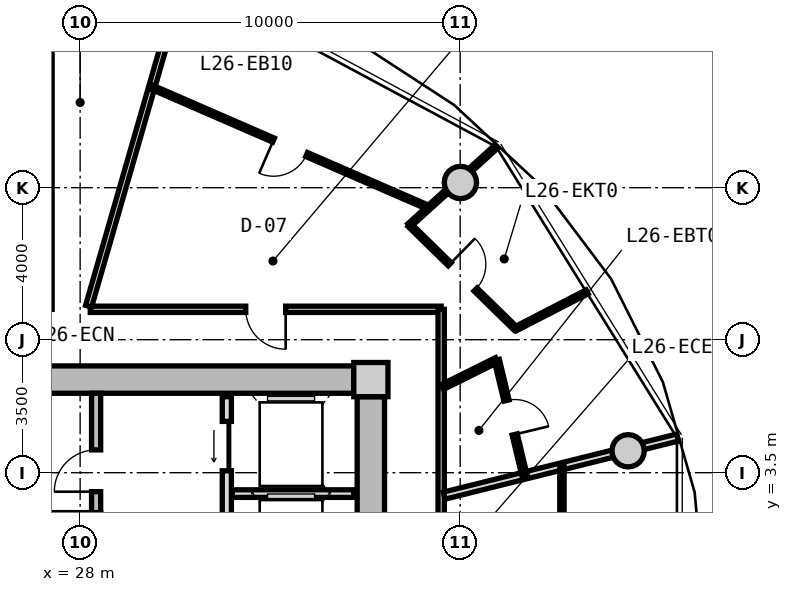
"""IFC4 building model, lengths in metres.
Left out: names, types, materials, properties, quantities, classifications, styles, units other than length and angle.
Written with IfcOpenShell. Run it as: python <this file> out.ifc"""

import sys

from ifc_helpers import new_model, si_unit, direction, frame, frame_2d, origin, origin_2d, place, context, subcontext, project, spatial, rectangle, circle, extrude, source, transform, mapped, element, fill, save


model = new_model("IFC4")
c1 = context("Model", 3, precision=1e-05, world=origin(), true_north=direction((0.0, 1.0)))
c2 = subcontext(c1, "Body", "Model", "MODEL_VIEW")
j1 = project(units=[si_unit("LENGTHUNIT", "METRE"), si_unit("PLANEANGLEUNIT", "RADIAN")], contexts=[c1])
p1 = place(None, origin())
s1 = spatial("IfcSite", under=j1, at=p1, CompositionType="ELEMENT")
p2 = place(p1, origin())
s2 = spatial("IfcBuilding", under=s1, at=p2, CompositionType="ELEMENT")
p3 = place(p2, frame((0.0, 0.0, 87.1)))
s3 = spatial("IfcBuildingStorey", under=s2, at=p3, CompositionType="ELEMENT", Elevation=87.1)
m1 = source(origin(), c2, "Body", "SweptSolid", [
    extrude(rectangle(XDim=0.9, YDim=0.9, at=origin_2d()), origin(), (0.0, 0.0, 1.0), 3.05),
])
p4 = place(p3, frame((35.65, 5.95, 0.0), z_axis=(0.0, 0.0, 1.0), x_axis=(1.0, 0.0, 0.0)))
e1 = element("IfcColumn", 1, at=p4, inside=s3, PredefinedType="COLUMN", context=c2, shape_type="MappedRepresentation", body=[
    mapped(m1, transform((0.0, 0.0, 0.0), x_axis=(1.0, 0.0, 0.0), y_axis=(0.0, 1.0, 0.0), z_axis=(0.0, 0.0, 1.0), scale=1.0)),
])
m2 = source(origin(), c2, "Body", "SweptSolid", [
    extrude(rectangle(XDim=14.4, YDim=0.72, at=frame_2d((7.2, 0.0))), origin(), (0.0, 0.0, 1.0), 2.79),
])
p5 = place(p3, frame((20.8, 5.95, 0.0), z_axis=(0.0, 0.0, 1.0), x_axis=(1.0, 0.0, 0.0)))
e2 = element("IfcWall", 2, at=p5, inside=s3, PredefinedType="SHEAR", context=c2, shape_type="MappedRepresentation", body=[
    mapped(m2, transform((0.0, 0.0, 0.0), x_axis=(1.0, 0.0, 0.0), y_axis=(0.0, 1.0, 0.0), z_axis=(0.0, 0.0, 1.0), scale=1.0)),
])
m3 = source(origin(), c2, "Body", "SweptSolid", [
    extrude(rectangle(XDim=11.0, YDim=0.72, at=frame_2d((5.5, 0.0))), origin(), (0.0, 0.0, 1.0), 2.79),
])
p6 = place(p3, frame((35.65, 5.5, 0.0), z_axis=(0.0, 0.0, 1.0), x_axis=(0.0, -1.0, 0.0)))
e3 = element("IfcWall", 3, at=p6, inside=s3, PredefinedType="SHEAR", context=c2, shape_type="MappedRepresentation", body=[
    mapped(m3, transform((0.0, 0.0, 0.0), x_axis=(1.0, 0.0, 0.0), y_axis=(0.0, 1.0, 0.0), z_axis=(0.0, 0.0, 1.0), scale=1.0)),
])
p7 = place(p6, frame((5.65, 0.0, 0.0)))
e4 = element("IfcOpeningElement", 4, at=p7, cuts=e3, PredefinedType="OPENING", context=c2, shape_type="SweptSolid", body=[
    extrude(rectangle(XDim=1.2, YDim=2.15, at=frame_2d((0.6, 1.075))), frame((0.0, 0.37, 0.0), z_axis=(0.0, -1.0, 0.0), x_axis=(1.0, 0.0, 0.0)), (0.0, 0.0, 1.0), 0.74),
])
m4 = source(origin(), c2, "Body", "SweptSolid", [
    extrude(circle(Radius=0.425, at=origin_2d()), origin(), (0.0, 0.0, 1.0), 3.05),
])
for number, where, z_axis, x_axis in (
    (5, (42.419, 4.076, 0.0), (0.0, 0.0, 1.0), (1.0, 0.0, 0.0)),
    (6, (38.006, 11.137, 0.0), (0.0, 0.0, 1.0), (1.0, 0.0, 0.0)),
):
    element("IfcColumn", number, at=place(p3, frame(where, z_axis=z_axis, x_axis=x_axis)), inside=s3, PredefinedType="COLUMN", context=c2, shape_type="MappedRepresentation", body=[
        mapped(m4, transform((0.0, 0.0, 0.0), x_axis=(1.0, 0.0, 0.0), y_axis=(0.0, 1.0, 0.0), z_axis=(0.0, 0.0, 1.0), scale=1.0)),
    ])
m5 = source(origin(), c2, "Body", "SweptSolid", [
    extrude(rectangle(XDim=3.14, YDim=0.24, at=frame_2d((1.57, 0.0))), origin(), (0.0, 0.0, 1.0), 2.79),
])
p8 = place(p3, frame((28.42, 2.45, 0.0), z_axis=(0.0, 0.0, 1.0), x_axis=(0.0, 1.0, 0.0)))
e7 = element("IfcWall", 7, at=p8, inside=s3, PredefinedType="PARTITIONING", context=c2, shape_type="MappedRepresentation", body=[
    mapped(m5, transform((0.0, 0.0, 0.0), x_axis=(1.0, 0.0, 0.0), y_axis=(0.0, 1.0, 0.0), z_axis=(0.0, 0.0, 1.0), scale=1.0)),
])
p9 = place(p8, frame((0.55, 0.0, 0.0)))
e8 = element("IfcOpeningElement", 8, at=p9, cuts=e7, PredefinedType="OPENING", context=c2, shape_type="SweptSolid", body=[
    extrude(rectangle(XDim=1.1, YDim=2.15, at=frame_2d((0.55, 1.075))), frame((0.0, 0.13, 0.0), z_axis=(0.0, -1.0, 0.0), x_axis=(1.0, 0.0, 0.0)), (0.0, 0.0, 1.0), 0.26),
])
m6 = source(origin(), c2, "Body", "SweptSolid", [
    extrude(rectangle(XDim=5.0, YDim=0.24, at=frame_2d((2.5, 0.0))), origin(), (0.0, 0.0, 1.0), 2.775),
])
p10 = place(p3, frame((31.86, 0.5, 0.0), z_axis=(0.0, 0.0, 1.0), x_axis=(0.0, 1.0, 0.0)))
e9 = element("IfcWall", 9, at=p10, inside=s3, PredefinedType="PARTITIONING", context=c2, shape_type="MappedRepresentation", body=[
    mapped(m6, transform((0.0, 0.0, 0.0), x_axis=(1.0, 0.0, 0.0), y_axis=(0.0, 1.0, 0.0), z_axis=(0.0, 0.0, 1.0), scale=1.0)),
])
p11 = place(p10, frame((3.05, 0.0, 0.0)))
e10 = element("IfcOpeningElement", 10, at=p11, cuts=e9, PredefinedType="OPENING", context=c2, shape_type="SweptSolid", body=[
    extrude(rectangle(XDim=1.3, YDim=2.2, at=frame_2d((0.65, 1.1))), frame((0.0, 0.13, 0.0), z_axis=(0.0, -1.0, 0.0), x_axis=(1.0, 0.0, 0.0)), (0.0, 0.0, 1.0), 0.26),
])
p12 = place(p10, frame((0.55, 0.0, 0.0)))
e11 = element("IfcOpeningElement", 11, at=p12, cuts=e9, PredefinedType="OPENING", context=c2, shape_type="SweptSolid", body=[
    extrude(rectangle(XDim=1.3, YDim=2.2, at=frame_2d((0.65, 1.1))), frame((0.0, 0.13, 0.0), z_axis=(0.0, -1.0, 0.0), x_axis=(1.0, 0.0, 0.0)), (0.0, 0.0, 1.0), 0.26),
])
m7 = source(origin(), c2, "Body", "SweptSolid", [
    extrude(rectangle(XDim=3.2, YDim=0.2, at=frame_2d((1.6, 0.0))), origin(), (0.0, 0.0, 1.0), 2.775),
])
p13 = place(p3, frame((32.0, 2.95, 0.0), z_axis=(0.0, 0.0, 1.0), x_axis=(1.0, 0.0, 0.0)))
e12 = element("IfcWall", 12, at=p13, inside=s3, PredefinedType="PARTITIONING", context=c2, shape_type="MappedRepresentation", body=[
    mapped(m7, transform((0.0, 0.0, 0.0), x_axis=(1.0, 0.0, 0.0), y_axis=(0.0, 1.0, 0.0), z_axis=(0.0, 0.0, 1.0), scale=1.0)),
])
m8 = source(origin(), c2, "Body", "SweptSolid", [
    extrude(rectangle(XDim=9.234, YDim=0.165, at=frame_2d((4.617, 0.0))), origin(), (0.0, 0.0, 1.0), 2.775),
])
p14 = place(p3, frame((28.266, 7.8, 0.0), z_axis=(0.0, 0.0, 1.0), x_axis=(1.0, 0.0, 0.0)))
e13 = element("IfcWall", 13, at=p14, inside=s3, PredefinedType="PARTITIONING", context=c2, shape_type="MappedRepresentation", body=[
    mapped(m8, transform((0.0, 0.0, 0.0), x_axis=(1.0, 0.0, 0.0), y_axis=(0.0, 1.0, 0.0), z_axis=(0.0, 0.0, 1.0), scale=1.0)),
])
p15 = place(p14, frame((4.092, 0.0, 0.0)))
e14 = element("IfcOpeningElement", 14, at=p15, cuts=e13, PredefinedType="OPENING", context=c2, shape_type="SweptSolid", body=[
    extrude(rectangle(XDim=1.05, YDim=2.15, at=frame_2d((0.525, 1.075))), frame((0.0, 0.093, 0.0), z_axis=(0.0, -1.0, 0.0), x_axis=(1.0, 0.0, 0.0)), (0.0, 0.0, 1.0), 0.185),
])
m9 = source(origin(), c2, "Body", "SweptSolid", [
    extrude(rectangle(XDim=15.6, YDim=0.165, at=frame_2d((7.8, 0.0))), origin(), (0.0, 0.0, 1.0), 2.775),
])
p16 = place(p3, frame((37.5, 7.8, 0.0), z_axis=(0.0, 0.0, 1.0), x_axis=(0.0, -1.0, 0.0)))
e15 = element("IfcWall", 15, at=p16, inside=s3, PredefinedType="PARTITIONING", context=c2, shape_type="MappedRepresentation", body=[
    mapped(m9, transform((0.0, 0.0, 0.0), x_axis=(1.0, 0.0, 0.0), y_axis=(0.0, 1.0, 0.0), z_axis=(0.0, 0.0, 1.0), scale=1.0)),
])
p17 = place(p16, frame((9.177, 0.0, 0.0)))
e16 = element("IfcOpeningElement", 16, at=p17, cuts=e15, PredefinedType="OPENING", context=c2, shape_type="SweptSolid", body=[
    extrude(rectangle(XDim=1.05, YDim=2.15, at=frame_2d((0.525, 1.075))), frame((0.0, 0.093, 0.0), z_axis=(0.0, -1.0, 0.0), x_axis=(1.0, 0.0, 0.0)), (0.0, 0.0, 1.0), 0.185),
])
m10 = source(origin(), c2, "Body", "SweptSolid", [
    extrude(rectangle(XDim=8.989, YDim=0.165, at=frame_2d((4.495, 0.0))), origin(), (0.0, 0.0, 1.0), 2.275),
])
p18 = place(p3, frame((28.222, 7.88, 0.0), z_axis=(0.0, 0.0, 1.0), x_axis=(0.27702323008, 0.960863221274, 0.0)))
e17 = element("IfcWall", 17, at=p18, inside=s3, PredefinedType="PARTITIONING", context=c2, shape_type="MappedRepresentation", body=[
    mapped(m10, transform((0.0, 0.0, 0.0), x_axis=(1.0, 0.0, 0.0), y_axis=(0.0, 1.0, 0.0), z_axis=(0.0, 0.0, 1.0), scale=1.0)),
])
m11 = source(origin(), c2, "Body", "SweptSolid", [
    extrude(rectangle(XDim=6.331, YDim=0.19, at=frame_2d((3.165, 0.0))), origin(), (0.0, 0.0, 1.0), 2.275),
])
p19 = place(p3, frame((37.58, 2.896, 0.0), z_axis=(0.0, 0.0, 1.0), x_axis=(0.97036440661, 0.241646267062, 0.0)))
e18 = element("IfcWall", 18, at=p19, inside=s3, PredefinedType="PARTITIONING", context=c2, shape_type="MappedRepresentation", body=[
    mapped(m11, transform((0.0, 0.0, 0.0), x_axis=(1.0, 0.0, 0.0), y_axis=(0.0, 1.0, 0.0), z_axis=(0.0, 0.0, 1.0), scale=1.0)),
])
m12 = source(origin(), c2, "Body", "SweptSolid", [
    extrude(rectangle(XDim=7.375, YDim=0.115, at=frame_2d((3.688, 0.0))), origin(), (0.0, 0.0, 1.0), 2.775),
])
p20 = place(p3, frame((40.678, -3.688, 0.0), z_axis=(0.0, 0.0, 1.0), x_axis=(0.0, 1.0, 0.0)))
e19 = element("IfcWall", 19, at=p20, inside=s3, PredefinedType="PARTITIONING", context=c2, shape_type="MappedRepresentation", body=[
    mapped(m12, transform((0.0, 0.0, 0.0), x_axis=(1.0, 0.0, 0.0), y_axis=(0.0, 1.0, 0.0), z_axis=(0.0, 0.0, 1.0), scale=1.0)),
])
p21 = place(p20, frame((3.213, 0.0, 0.0)))
e20 = element("IfcOpeningElement", 20, at=p21, cuts=e19, PredefinedType="OPENING", context=c2, shape_type="SweptSolid", body=[
    extrude(rectangle(XDim=0.95, YDim=2.1, at=frame_2d((0.475, 1.05))), frame((0.0, 0.067, 0.0), z_axis=(0.0, -1.0, 0.0), x_axis=(1.0, 0.0, 0.0)), (0.0, 0.0, 1.0), 0.135),
])
m13 = source(origin(), c2, "Body", "SweptSolid", [
    extrude(rectangle(XDim=7.938, YDim=0.115, at=frame_2d((3.969, 0.0))), origin(), (0.0, 0.0, 1.0), 2.775),
])
p22 = place(p3, frame((37.164, 10.479, 0.0), z_axis=(0.0, 0.0, 1.0), x_axis=(-0.917052940979, 0.398765474235, 0.0)))
e21 = element("IfcWall", 21, at=p22, inside=s3, PredefinedType="PARTITIONING", context=c2, shape_type="MappedRepresentation", body=[
    mapped(m13, transform((0.0, 0.0, 0.0), x_axis=(1.0, 0.0, 0.0), y_axis=(0.0, 1.0, 0.0), z_axis=(0.0, 0.0, 1.0), scale=1.0)),
])
p23 = place(p22, frame((3.494, 0.0, 0.0)))
e22 = element("IfcOpeningElement", 22, at=p23, cuts=e21, PredefinedType="OPENING", context=c2, shape_type="SweptSolid", body=[
    extrude(rectangle(XDim=0.95, YDim=2.1, at=frame_2d((0.475, 1.05))), frame((0.0, 0.067, 0.0), z_axis=(0.0, -1.0, 0.0), x_axis=(1.0, 0.0, 0.0)), (0.0, 0.0, 1.0), 0.135),
])
m14 = source(origin(), c2, "Body", "SweptSolid", [
    extrude(rectangle(XDim=3.102, YDim=0.115, at=frame_2d((1.551, 0.0))), origin(), (0.0, 0.0, 1.0), 2.275),
])
p24 = place(p3, frame((36.661, 10.01, 0.0), z_axis=(0.0, 0.0, 1.0), x_axis=(0.741263481794, 0.671214161471, 0.0)))
e23 = element("IfcWall", 23, at=p24, inside=s3, PredefinedType="PARTITIONING", context=c2, shape_type="MappedRepresentation", body=[
    mapped(m14, transform((0.0, 0.0, 0.0), x_axis=(1.0, 0.0, 0.0), y_axis=(0.0, 1.0, 0.0), z_axis=(0.0, 0.0, 1.0), scale=1.0)),
])
m15 = source(origin(), c2, "Body", "SweptSolid", [
    extrude(rectangle(XDim=1.6, YDim=0.14, at=frame_2d((0.8, 0.0))), origin(), (0.0, 0.0, 1.0), 2.775),
])
p25 = place(p3, frame((37.53, 5.754, 0.0), z_axis=(0.0, 0.0, 1.0), x_axis=(0.895522919837, 0.445015393044, 0.0)))
e24 = element("IfcWall", 24, at=p25, inside=s3, PredefinedType="PARTITIONING", context=c2, shape_type="MappedRepresentation", body=[
    mapped(m15, transform((0.0, 0.0, 0.0), x_axis=(1.0, 0.0, 0.0), y_axis=(0.0, 1.0, 0.0), z_axis=(0.0, 0.0, 1.0), scale=1.0)),
])
m16 = source(origin(), c2, "Body", "SweptSolid", [
    extrude(rectangle(XDim=3.112, YDim=0.14, at=frame_2d((1.556, 0.0))), origin(), (0.0, 0.0, 1.0), 2.415),
])
p26 = place(p3, frame((38.963, 6.466, 0.0), z_axis=(0.0, 0.0, 1.0), x_axis=(0.233737944029, -0.972299631555, 0.0)))
e25 = element("IfcWall", 25, at=p26, inside=s3, PredefinedType="PARTITIONING", context=c2, shape_type="MappedRepresentation", body=[
    mapped(m16, transform((0.0, 0.0, 0.0), x_axis=(1.0, 0.0, 0.0), y_axis=(0.0, 1.0, 0.0), z_axis=(0.0, 0.0, 1.0), scale=1.0)),
])
p27 = place(p26, frame((1.096, 0.0, 0.0)))
e26 = element("IfcOpeningElement", 26, at=p27, cuts=e25, PredefinedType="OPENING", context=c2, shape_type="SweptSolid", body=[
    extrude(rectangle(XDim=0.92, YDim=2.1, at=frame_2d((0.46, 1.05))), frame((0.0, 0.08, 0.0), z_axis=(0.0, -1.0, 0.0), x_axis=(1.0, 0.0, 0.0)), (0.0, 0.0, 1.0), 0.16),
])
m17 = source(origin(), c2, "Body", "SweptSolid", [
    extrude(rectangle(XDim=2.117, YDim=0.115, at=frame_2d((1.059, 0.0))), origin(), (0.0, 0.0, 1.0), 2.775),
])
p28 = place(p3, frame((39.46, 7.289, 0.0), z_axis=(0.0, 0.0, 1.0), x_axis=(0.888941834945, 0.45802010227, 0.0)))
e27 = element("IfcWall", 27, at=p28, inside=s3, PredefinedType="PARTITIONING", context=c2, shape_type="MappedRepresentation", body=[
    mapped(m17, transform((0.0, 0.0, 0.0), x_axis=(1.0, 0.0, 0.0), y_axis=(0.0, 1.0, 0.0), z_axis=(0.0, 0.0, 1.0), scale=1.0)),
])
m18 = source(origin(), c2, "Body", "SweptSolid", [
    extrude(rectangle(XDim=3.902, YDim=0.115, at=frame_2d((1.951, 0.0))), origin(), (0.0, 0.0, 1.0), 2.775),
])
p29 = place(p3, frame((39.46, 7.289, 0.0), z_axis=(0.0, 0.0, 1.0), x_axis=(-0.714853061854, 0.699274695637, 0.0)))
e28 = element("IfcWall", 28, at=p29, inside=s3, PredefinedType="PARTITIONING", context=c2, shape_type="MappedRepresentation", body=[
    mapped(m18, transform((0.0, 0.0, 0.0), x_axis=(1.0, 0.0, 0.0), y_axis=(0.0, 1.0, 0.0), z_axis=(0.0, 0.0, 1.0), scale=1.0)),
])
p30 = place(p29, frame((1.476, 0.0, 0.0)))
e29 = element("IfcOpeningElement", 29, at=p30, cuts=e28, PredefinedType="OPENING", context=c2, shape_type="SweptSolid", body=[
    extrude(rectangle(XDim=0.95, YDim=2.1, at=frame_2d((0.475, 1.05))), frame((0.0, 0.067, 0.0), z_axis=(0.0, -1.0, 0.0), x_axis=(1.0, 0.0, 0.0)), (0.0, 0.0, 1.0), 0.135),
])
m19 = source(origin(), c2, "Body", "SweptSolid", [
    extrude(rectangle(XDim=1.1, YDim=2.15, at=frame_2d((0.55, 1.075))), frame((0.0, 0.025, 0.0), z_axis=(0.0, -1.0, 0.0), x_axis=(1.0, 0.0, 0.0)), (0.0, 0.0, 1.0), 0.05),
])
p31 = place(p9, origin())
e30 = element("IfcDoor", 30, at=p31, inside=s3, OperationType="SINGLE_SWING_LEFT", PredefinedType="DOOR", context=c2, shape_type="MappedRepresentation", body=[
    mapped(m19, transform((0.0, 0.0, 0.0), x_axis=(1.0, 0.0, 0.0), y_axis=(0.0, 1.0, 0.0), z_axis=(0.0, 0.0, 1.0), scale=1.0)),
])
fill(e8, e30)
m20 = source(origin(), c2, "Body", "SweptSolid", [
    extrude(rectangle(XDim=1.3, YDim=2.2, at=frame_2d((0.65, 1.1))), frame((0.0, 0.025, 0.0), z_axis=(0.0, -1.0, 0.0), x_axis=(1.0, 0.0, 0.0)), (0.0, 0.0, 1.0), 0.05),
])
p32 = place(p11, origin())
e31 = element("IfcDoor", 31, at=p32, inside=s3, OperationType="SLIDING_TO_LEFT", PredefinedType="DOOR", context=c2, shape_type="MappedRepresentation", body=[
    mapped(m20, transform((0.0, 0.0, 0.0), x_axis=(1.0, 0.0, 0.0), y_axis=(0.0, 1.0, 0.0), z_axis=(0.0, 0.0, 1.0), scale=1.0)),
])
fill(e10, e31)
m21 = source(origin(), c2, "Body", "SweptSolid", [
    extrude(rectangle(XDim=1.05, YDim=2.15, at=frame_2d((0.525, 1.075))), frame((0.0, 0.025, 0.0), z_axis=(0.0, -1.0, 0.0), x_axis=(1.0, 0.0, 0.0)), (0.0, 0.0, 1.0), 0.05),
])
p33 = place(p15, frame((1.05, 0.0, 0.0), z_axis=(0.0, 0.0, 1.0), x_axis=(-1.0, 0.0, 0.0)))
e32 = element("IfcDoor", 32, at=p33, inside=s3, OperationType="SINGLE_SWING_LEFT", PredefinedType="DOOR", context=c2, shape_type="MappedRepresentation", body=[
    mapped(m21, transform((0.0, 0.0, 0.0), x_axis=(1.0, 0.0, 0.0), y_axis=(0.0, 1.0, 0.0), z_axis=(0.0, 0.0, 1.0), scale=1.0)),
])
fill(e14, e32)
m22 = source(origin(), c2, "Body", "SweptSolid", [
    extrude(rectangle(XDim=0.92, YDim=2.1, at=frame_2d((0.46, 1.05))), frame((0.0, 0.025, 0.0), z_axis=(0.0, -1.0, 0.0), x_axis=(1.0, 0.0, 0.0)), (0.0, 0.0, 1.0), 0.05),
])
p34 = place(p27, origin())
e33 = element("IfcDoor", 33, at=p34, inside=s3, OperationType="SINGLE_SWING_RIGHT", PredefinedType="DOOR", context=c2, shape_type="MappedRepresentation", body=[
    mapped(m22, transform((0.0, 0.0, 0.0), x_axis=(1.0, 0.0, 0.0), y_axis=(0.0, 1.0, 0.0), z_axis=(0.0, 0.0, 1.0), scale=1.0)),
])
fill(e26, e33)
m23 = source(origin(), c2, "Body", "SweptSolid", [
    extrude(rectangle(XDim=0.95, YDim=2.1, at=frame_2d((0.475, 1.05))), frame((0.0, 0.025, 0.0), z_axis=(0.0, -1.0, 0.0), x_axis=(1.0, 0.0, 0.0)), (0.0, 0.0, 1.0), 0.05),
])
p35 = place(p30, frame((0.95, 0.0, 0.0), z_axis=(0.0, 0.0, 1.0), x_axis=(-1.0, 0.0, 0.0)))
e34 = element("IfcDoor", 34, at=p35, inside=s3, OperationType="SINGLE_SWING_LEFT", PredefinedType="DOOR", context=c2, shape_type="MappedRepresentation", body=[
    mapped(m23, transform((0.0, 0.0, 0.0), x_axis=(1.0, 0.0, 0.0), y_axis=(0.0, 1.0, 0.0), z_axis=(0.0, 0.0, 1.0), scale=1.0)),
])
fill(e29, e34)
p36 = place(p23, origin())
e35 = element("IfcDoor", 35, at=p36, inside=s3, OperationType="SINGLE_SWING_RIGHT", PredefinedType="DOOR", context=c2, shape_type="MappedRepresentation", body=[
    mapped(m23, transform((0.0, 0.0, 0.0), x_axis=(1.0, 0.0, 0.0), y_axis=(0.0, 1.0, 0.0), z_axis=(0.0, 0.0, 1.0), scale=1.0)),
])
fill(e22, e35)
save(model, sys.argv[1])
